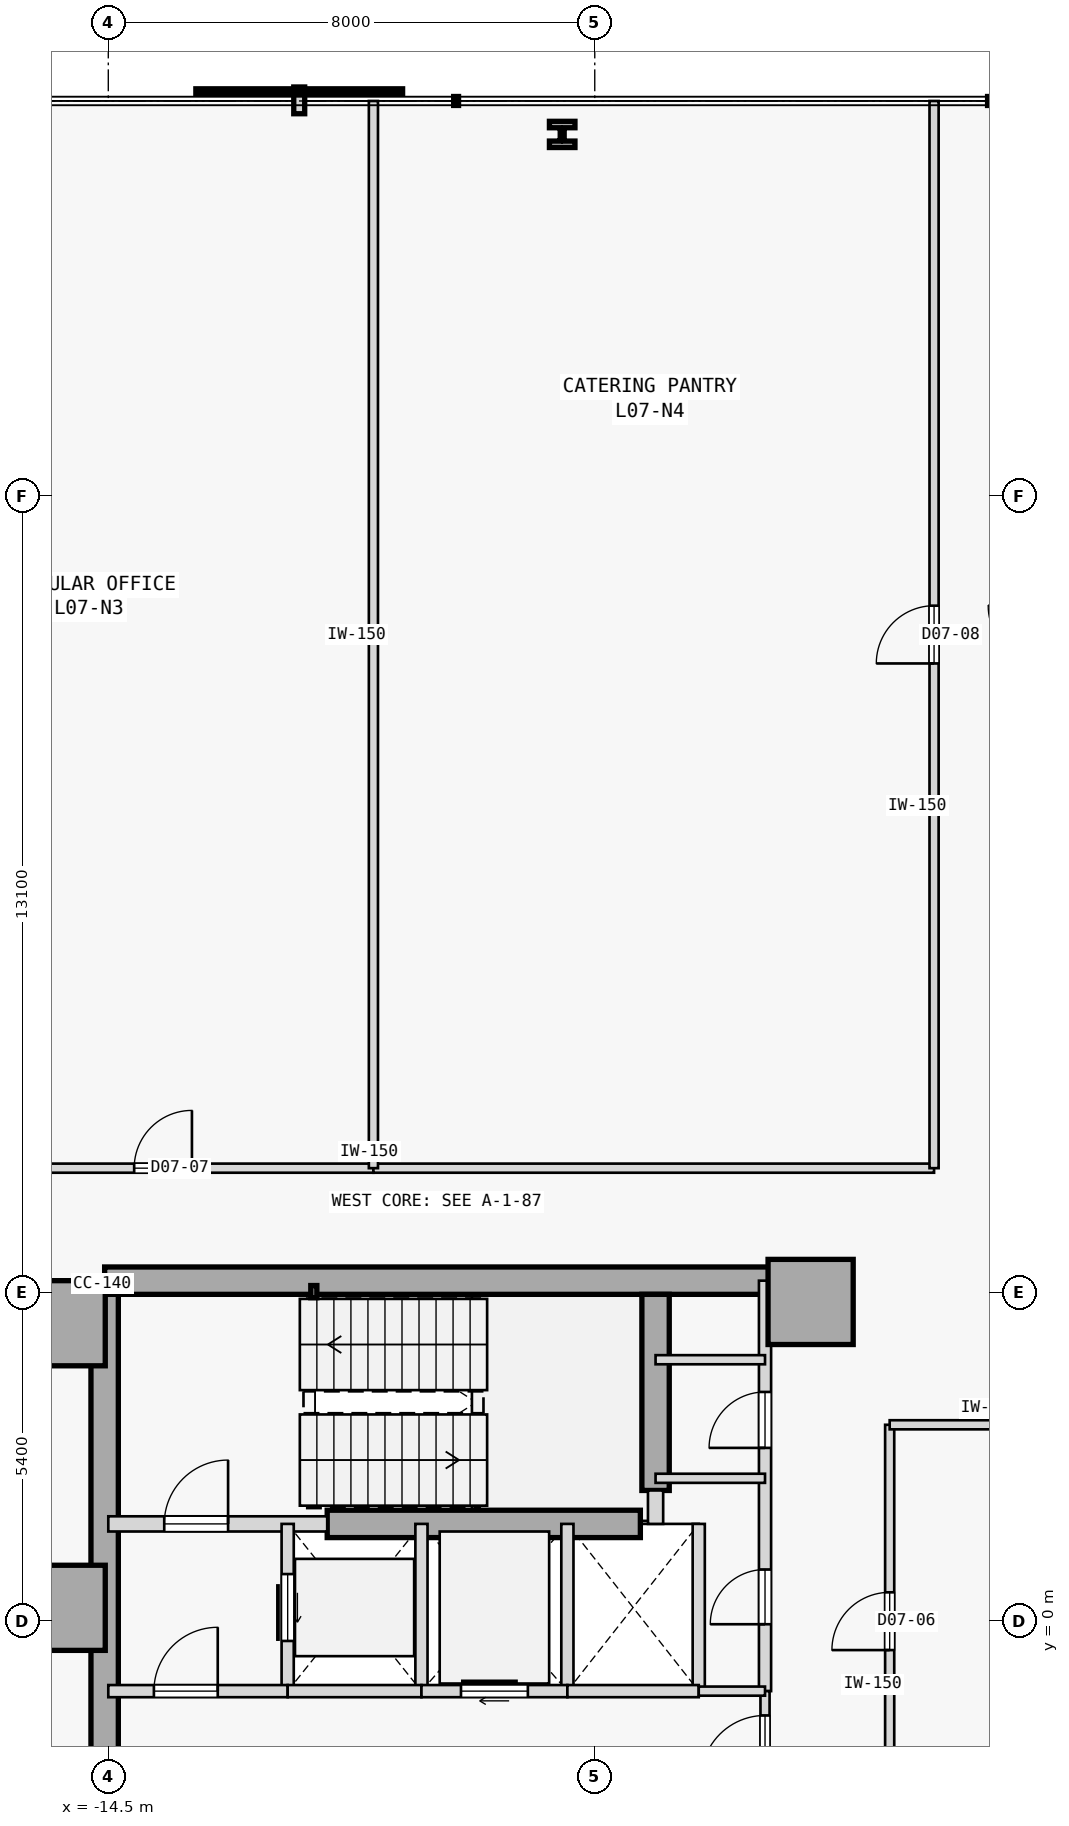
"""IFC4 building model, lengths in metres.
Left out: names, types, materials, properties, quantities, classifications, styles, units other than length and angle.
Written with IfcOpenShell. Run it as: python <this file> out.ifc"""

import sys

from ifc_helpers import new_model, si_unit, direction, frame, frame_2d, origin, origin_2d, place, context, subcontext, project, spatial, rectangle, hollow_rectangle, i_section, extrude, element, fill, save


model = new_model("IFC4")
c1 = context("Model", 3, precision=1e-05, world=origin(), true_north=direction((0.0, 1.0)))
c2 = subcontext(c1, "Body", "Model", "MODEL_VIEW")
j1 = project(units=[si_unit("LENGTHUNIT", "METRE"), si_unit("PLANEANGLEUNIT", "RADIAN")], contexts=[c1])
p1 = place(None, origin())
s1 = spatial("IfcSite", under=j1, at=p1, CompositionType="ELEMENT")
p2 = place(p1, origin())
s2 = spatial("IfcBuilding", under=s1, at=p2, CompositionType="ELEMENT")
p3 = place(p2, frame((0.0, 0.0, 33.2)))
s3 = spatial("IfcBuildingStorey", under=s2, at=p3, CompositionType="ELEMENT", Elevation=33.2)
for number, where, z_axis, x_axis in (
    (1, (-15.25, 4.9, 0.0), (0.0, 0.0, 1.0), (1.0, 0.0, 0.0)),
    (2, (-15.25, 0.22, 0.0), (0.0, 0.0, 1.0), (1.0, 0.0, 0.0)),
    (3, (-2.95, 5.25, 0.0), (0.0, 0.0, 1.0), (1.0, 0.0, 0.0)),
):
    element("IfcColumn", number, at=place(p3, frame(where, z_axis=z_axis, x_axis=x_axis)), inside=s3, PredefinedType="COLUMN", context=c2, shape_type="SweptSolid", body=[
        extrude(rectangle(XDim=1.4, YDim=1.4, at=origin_2d()), origin(), (0.0, 0.0, 1.0), 3.8),
    ])
p4 = place(p3, frame((-14.56, 5.6, 0.0), z_axis=(0.0, 0.0, 1.0), x_axis=(1.0, 0.0, 0.0)))
e4 = element("IfcWall", 4, at=p4, inside=s3, PredefinedType="SHEAR", context=c2, shape_type="SweptSolid", body=[
    extrude(rectangle(XDim=11.41, YDim=0.45, at=frame_2d((5.705, 0.0))), origin(), (0.0, 0.0, 1.0), 3.575),
])
p5 = place(p3, frame((-14.56, -5.375, 0.0), z_axis=(0.0, 0.0, 1.0), x_axis=(0.0, 1.0, 0.0)))
e5 = element("IfcWall", 5, at=p5, inside=s3, PredefinedType="SHEAR", context=c2, shape_type="SweptSolid", body=[
    extrude(rectangle(XDim=10.75, YDim=0.45, at=frame_2d((5.375, 0.0))), origin(), (0.0, 0.0, 1.0), 3.575),
])
p6 = place(p3, frame((-5.5, 2.15, 0.0), z_axis=(0.0, 0.0, 1.0), x_axis=(0.0, 1.0, 0.0)))
e6 = element("IfcWall", 6, at=p6, inside=s3, PredefinedType="SHEAR", context=c2, shape_type="SweptSolid", body=[
    extrude(rectangle(XDim=3.225, YDim=0.45, at=frame_2d((1.613, 0.0))), origin(), (0.0, 0.0, 1.0), 3.575),
])
p7 = place(p3, frame((-10.9, 1.6, 0.0), z_axis=(0.0, 0.0, 1.0), x_axis=(1.0, 0.0, 0.0)))
e7 = element("IfcWall", 7, at=p7, inside=s3, PredefinedType="SHEAR", context=c2, shape_type="SweptSolid", body=[
    extrude(rectangle(XDim=5.15, YDim=0.45, at=frame_2d((2.575, 0.0))), origin(), (0.0, 0.0, 1.0), 3.575),
])
p8 = place(p3, frame((-11.12, 5.42, 0.0), z_axis=(0.0, 0.0, 1.0), x_axis=(1.0, 0.0, 0.0)))
e8 = element("IfcColumn", 8, at=p8, inside=s3, PredefinedType="COLUMN", context=c2, shape_type="SweptSolid", body=[
    extrude(hollow_rectangle(XDim=0.1, YDim=0.2, WallThickness=0.008, at=origin_2d()), origin(), (0.0, 0.0, 1.0), 3.8),
])
p9 = place(p3, frame((-7.036, 24.45, 0.0), z_axis=(0.0, 0.0, 1.0), x_axis=(1.0, 0.0, 0.0)))
e9 = element("IfcColumn", 9, at=p9, inside=s3, PredefinedType="COLUMN", context=c2, shape_type="SweptSolid", body=[
    extrude(i_section(OverallWidth=0.42, OverallDepth=0.431, WebThickness=0.065, FlangeThickness=0.106, FilletRadius=0.015, at=origin_2d()), origin(), (0.0, 0.0, 1.0), 3.8),
])
p10 = place(p3, frame((-14.5, 1.6, 0.0), z_axis=(0.0, 0.0, 1.0), x_axis=(1.0, 0.0, 0.0)))
e10 = element("IfcWall", 10, at=p10, inside=s3, PredefinedType="STANDARD", context=c2, shape_type="SweptSolid", body=[
    extrude(rectangle(XDim=3.6, YDim=0.25, at=frame_2d((1.8, 0.0))), origin(), (0.0, 0.0, 1.0), 3.575),
])
p11 = place(p10, frame((0.92, 0.0, 0.0)))
e11 = element("IfcOpeningElement", 11, at=p11, cuts=e10, PredefinedType="OPENING", context=c2, shape_type="SweptSolid", body=[
    extrude(rectangle(XDim=1.05, YDim=2.15, at=frame_2d((0.525, 1.075))), frame((0.0, 0.135, 0.0), z_axis=(0.0, -1.0, 0.0), x_axis=(1.0, 0.0, 0.0)), (0.0, 0.0, 1.0), 0.27),
])
p12 = place(p3, frame((-5.5, 1.6, 0.0), z_axis=(0.0, 0.0, 1.0), x_axis=(0.0, 1.0, 0.0)))
e12 = element("IfcWall", 12, at=p12, inside=s3, PredefinedType="STANDARD", context=c2, shape_type="SweptSolid", body=[
    extrude(rectangle(XDim=0.55, YDim=0.25, at=frame_2d((0.275, 0.0))), origin(), (0.0, 0.0, 1.0), 3.575),
])
p13 = place(p3, frame((-3.7, -1.15, 0.0), z_axis=(0.0, 0.0, 1.0), x_axis=(0.0, 1.0, 0.0)))
e13 = element("IfcWall", 13, at=p13, inside=s3, PredefinedType="STANDARD", context=c2, shape_type="SweptSolid", body=[
    extrude(rectangle(XDim=6.75, YDim=0.2, at=frame_2d((3.375, 0.0))), origin(), (0.0, 0.0, 1.0), 3.575),
])
p14 = place(p13, frame((1.1, 0.0, 0.0)))
e14 = element("IfcOpeningElement", 14, at=p14, cuts=e13, PredefinedType="OPENING", context=c2, shape_type="SweptSolid", body=[
    extrude(rectangle(XDim=0.9, YDim=2.15, at=frame_2d((0.45, 1.075))), frame((0.0, 0.11, 0.0), z_axis=(0.0, -1.0, 0.0), x_axis=(1.0, 0.0, 0.0)), (0.0, 0.0, 1.0), 0.22),
])
p15 = place(p13, frame((4.0, 0.0, 0.0)))
e15 = element("IfcOpeningElement", 15, at=p15, cuts=e13, PredefinedType="OPENING", context=c2, shape_type="SweptSolid", body=[
    extrude(rectangle(XDim=0.92, YDim=2.15, at=frame_2d((0.46, 1.075))), frame((0.0, 0.11, 0.0), z_axis=(0.0, -1.0, 0.0), x_axis=(1.0, 0.0, 0.0)), (0.0, 0.0, 1.0), 0.22),
])
p16 = place(p3, frame((-3.7, -2.95, 0.0), z_axis=(0.0, 0.0, 1.0), x_axis=(0.0, 1.0, 0.0)))
e16 = element("IfcWall", 16, at=p16, inside=s3, PredefinedType="PARTITIONING", context=c2, shape_type="SweptSolid", body=[
    extrude(rectangle(XDim=1.8, YDim=0.15, at=frame_2d((0.9, 0.0))), origin(), (0.0, 0.0, 1.0), 3.575),
])
p17 = place(p16, frame((0.35, 0.0, 0.0)))
e17 = element("IfcOpeningElement", 17, at=p17, cuts=e16, PredefinedType="OPENING", context=c2, shape_type="SweptSolid", body=[
    extrude(rectangle(XDim=1.05, YDim=2.18, at=frame_2d((0.525, 1.09))), frame((0.0, 0.085, 0.0), z_axis=(0.0, -1.0, 0.0), x_axis=(1.0, 0.0, 0.0)), (0.0, 0.0, 1.0), 0.17),
])
p18 = place(p3, frame((-11.55, -1.15, 0.0), z_axis=(0.0, 0.0, 1.0), x_axis=(0.0, 1.0, 0.0)))
e18 = element("IfcWall", 18, at=p18, inside=s3, PredefinedType="STANDARD", context=c2, shape_type="SweptSolid", body=[
    extrude(rectangle(XDim=2.75, YDim=0.2, at=frame_2d((1.375, 0.0))), origin(), (0.0, 0.0, 1.0), 3.575),
])
p19 = place(p18, frame((0.825, 0.0, 0.0)))
e19 = element("IfcOpeningElement", 19, at=p19, cuts=e18, PredefinedType="OPENING", context=c2, shape_type="SweptSolid", body=[
    extrude(rectangle(XDim=1.1, YDim=2.15, at=frame_2d((0.55, 1.075))), frame((0.0, 0.11, 0.0), z_axis=(0.0, -1.0, 0.0), x_axis=(1.0, 0.0, 0.0)), (0.0, 0.0, 1.0), 0.22),
])
p20 = place(p3, frame((-9.35, -1.15, 0.0), z_axis=(0.0, 0.0, 1.0), x_axis=(0.0, 1.0, 0.0)))
e20 = element("IfcWall", 20, at=p20, inside=s3, PredefinedType="STANDARD", context=c2, shape_type="SweptSolid", body=[
    extrude(rectangle(XDim=2.75, YDim=0.2, at=frame_2d((1.375, 0.0))), origin(), (0.0, 0.0, 1.0), 3.575),
])
p21 = place(p3, frame((-14.5, -1.15, 0.0), z_axis=(0.0, 0.0, 1.0), x_axis=(1.0, 0.0, 0.0)))
e21 = element("IfcWall", 21, at=p21, inside=s3, PredefinedType="STANDARD", context=c2, shape_type="SweptSolid", body=[
    extrude(rectangle(XDim=2.95, YDim=0.2, at=frame_2d((1.475, 0.0))), origin(), (0.0, 0.0, 1.0), 3.575),
])
p22 = place(p21, frame((0.75, 0.0, 0.0)))
e22 = element("IfcOpeningElement", 22, at=p22, cuts=e21, PredefinedType="OPENING", context=c2, shape_type="SweptSolid", body=[
    extrude(rectangle(XDim=1.05, YDim=2.18, at=frame_2d((0.525, 1.09))), frame((0.0, 0.11, 0.0), z_axis=(0.0, -1.0, 0.0), x_axis=(1.0, 0.0, 0.0)), (0.0, 0.0, 1.0), 0.22),
])
p23 = place(p3, frame((-11.55, -1.15, 0.0), z_axis=(0.0, 0.0, 1.0), x_axis=(1.0, 0.0, 0.0)))
e23 = element("IfcWall", 23, at=p23, inside=s3, PredefinedType="STANDARD", context=c2, shape_type="SweptSolid", body=[
    extrude(rectangle(XDim=2.2, YDim=0.2, at=frame_2d((1.1, 0.0))), origin(), (0.0, 0.0, 1.0), 3.575),
])
p24 = place(p3, frame((-6.95, -1.15, 0.0), z_axis=(0.0, 0.0, 1.0), x_axis=(0.0, 1.0, 0.0)))
e24 = element("IfcWall", 24, at=p24, inside=s3, PredefinedType="STANDARD", context=c2, shape_type="SweptSolid", body=[
    extrude(rectangle(XDim=2.75, YDim=0.2, at=frame_2d((1.375, 0.0))), origin(), (0.0, 0.0, 1.0), 3.575),
])
p25 = place(p3, frame((-9.35, -1.15, 0.0), z_axis=(0.0, 0.0, 1.0), x_axis=(1.0, 0.0, 0.0)))
e25 = element("IfcWall", 25, at=p25, inside=s3, PredefinedType="STANDARD", context=c2, shape_type="SweptSolid", body=[
    extrude(rectangle(XDim=2.4, YDim=0.2, at=frame_2d((1.2, 0.0))), origin(), (0.0, 0.0, 1.0), 3.575),
])
p26 = place(p25, frame((0.65, 0.0, 0.0)))
e26 = element("IfcOpeningElement", 26, at=p26, cuts=e25, PredefinedType="OPENING", context=c2, shape_type="SweptSolid", body=[
    extrude(rectangle(XDim=1.1, YDim=2.15, at=frame_2d((0.55, 1.075))), frame((0.0, 0.11, 0.0), z_axis=(0.0, -1.0, 0.0), x_axis=(1.0, 0.0, 0.0)), (0.0, 0.0, 1.0), 0.22),
])
p27 = place(p3, frame((-4.79, -1.15, 0.0), z_axis=(0.0, 0.0, 1.0), x_axis=(0.0, 1.0, 0.0)))
e27 = element("IfcWall", 27, at=p27, inside=s3, PredefinedType="STANDARD", context=c2, shape_type="SweptSolid", body=[
    extrude(rectangle(XDim=2.75, YDim=0.2, at=frame_2d((1.375, 0.0))), origin(), (0.0, 0.0, 1.0), 3.575),
])
p28 = place(p3, frame((-6.95, -1.15, 0.0), z_axis=(0.0, 0.0, 1.0), x_axis=(1.0, 0.0, 0.0)))
e28 = element("IfcWall", 28, at=p28, inside=s3, PredefinedType="STANDARD", context=c2, shape_type="SweptSolid", body=[
    extrude(rectangle(XDim=2.16, YDim=0.2, at=frame_2d((1.08, 0.0))), origin(), (0.0, 0.0, 1.0), 3.575),
])
p29 = place(p3, frame((-4.79, -1.15, 0.0), z_axis=(0.0, 0.0, 1.0), x_axis=(1.0, 0.0, 0.0)))
e29 = element("IfcWall", 29, at=p29, inside=s3, PredefinedType="PARTITIONING", context=c2, shape_type="SweptSolid", body=[
    extrude(rectangle(XDim=1.09, YDim=0.15, at=frame_2d((0.545, 0.0))), origin(), (0.0, 0.0, 1.0), 3.575),
])
for number, where, z_axis, x_axis in (
    (30, (-5.5, 4.3, 0.0), (0.0, 0.0, 1.0), (1.0, 0.0, 0.0)),
    (31, (-5.5, 2.35, 0.0), (0.0, 0.0, 1.0), (1.0, 0.0, 0.0)),
):
    element("IfcWall", number, at=place(p3, frame(where, z_axis=z_axis, x_axis=x_axis)), inside=s3, PredefinedType="PARTITIONING", context=c2, shape_type="SweptSolid", body=[
        extrude(rectangle(XDim=1.8, YDim=0.15, at=frame_2d((0.9, 0.0))), origin(), (0.0, 0.0, 1.0), 3.575),
    ])
p30 = place(p3, frame((-1.65, -3.23, 0.0), z_axis=(0.0, 0.0, 1.0), x_axis=(0.0, 1.0, 0.0)))
e32 = element("IfcWall", 32, at=p30, inside=s3, PredefinedType="PARTITIONING", context=c2, shape_type="SweptSolid", body=[
    extrude(rectangle(XDim=6.46, YDim=0.15, at=frame_2d((3.23, 0.0))), origin(), (0.0, 0.0, 1.0), 3.575),
])
p31 = place(p30, frame((2.755, 0.0, 0.0)))
e33 = element("IfcOpeningElement", 33, at=p31, cuts=e32, PredefinedType="OPENING", context=c2, shape_type="SweptSolid", body=[
    extrude(rectangle(XDim=0.95, YDim=2.15, at=frame_2d((0.475, 1.075))), frame((0.0, 0.085, 0.0), z_axis=(0.0, -1.0, 0.0), x_axis=(1.0, 0.0, 0.0)), (0.0, 0.0, 1.0), 0.17),
])
p32 = place(p3, frame((-1.65, 3.23, 0.0), z_axis=(0.0, 0.0, 1.0), x_axis=(1.0, 0.0, 0.0)))
e34 = element("IfcWall", 34, at=p32, inside=s3, PredefinedType="PARTITIONING", context=c2, shape_type="SweptSolid", body=[
    extrude(rectangle(XDim=3.3, YDim=0.15, at=frame_2d((1.65, 0.0))), origin(), (0.0, 0.0, 1.0), 3.575),
])
p33 = place(p3, frame((-17.059, 7.45, 0.0), z_axis=(0.0, 0.0, 1.0), x_axis=(1.0, 0.0, 0.0)))
e35 = element("IfcWall", 35, at=p33, inside=s3, PredefinedType="PARTITIONING", context=c2, shape_type="SweptSolid", body=[
    extrude(rectangle(XDim=6.919, YDim=0.15, at=frame_2d((3.459, 0.0))), origin(), (0.0, 0.0, 1.0), 3.575),
])
p34 = place(p33, frame((2.985, 0.0, 0.0)))
e36 = element("IfcOpeningElement", 36, at=p34, cuts=e35, PredefinedType="OPENING", context=c2, shape_type="SweptSolid", body=[
    extrude(rectangle(XDim=0.95, YDim=2.15, at=frame_2d((0.475, 1.075))), frame((0.0, 0.085, 0.0), z_axis=(0.0, -1.0, 0.0), x_axis=(1.0, 0.0, 0.0)), (0.0, 0.0, 1.0), 0.17),
])
p35 = place(p3, frame((-10.14, 7.45, 0.0), z_axis=(0.0, 0.0, 1.0), x_axis=(1.0, 0.0, 0.0)))
e37 = element("IfcWall", 37, at=p35, inside=s3, PredefinedType="PARTITIONING", context=c2, shape_type="SweptSolid", body=[
    extrude(rectangle(XDim=9.22, YDim=0.15, at=frame_2d((4.61, 0.0))), origin(), (0.0, 0.0, 1.0), 3.575),
])
p36 = place(p3, frame((-0.92, 7.45, 0.0), z_axis=(0.0, 0.0, 1.0), x_axis=(0.0, 1.0, 0.0)))
e38 = element("IfcWall", 38, at=p36, inside=s3, PredefinedType="PARTITIONING", context=c2, shape_type="SweptSolid", body=[
    extrude(rectangle(XDim=17.55, YDim=0.15, at=frame_2d((8.775, 0.0))), origin(), (0.0, 0.0, 1.0), 3.575),
])
p37 = place(p36, frame((8.3, 0.0, 0.0)))
e39 = element("IfcOpeningElement", 39, at=p37, cuts=e38, PredefinedType="OPENING", context=c2, shape_type="SweptSolid", body=[
    extrude(rectangle(XDim=0.95, YDim=2.15, at=frame_2d((0.475, 1.075))), frame((0.0, 0.085, 0.0), z_axis=(0.0, -1.0, 0.0), x_axis=(1.0, 0.0, 0.0)), (0.0, 0.0, 1.0), 0.17),
])
p38 = place(p3, frame((-10.14, 7.45, 0.0), z_axis=(0.0, 0.0, 1.0), x_axis=(0.0, 1.0, 0.0)))
e40 = element("IfcWall", 40, at=p38, inside=s3, PredefinedType="PARTITIONING", context=c2, shape_type="SweptSolid", body=[
    extrude(rectangle(XDim=17.55, YDim=0.15, at=frame_2d((8.775, 0.0))), origin(), (0.0, 0.0, 1.0), 3.575),
])
p39 = place(p11, origin())
e41 = element("IfcDoor", 41, at=p39, inside=s3, OperationType="SINGLE_SWING_RIGHT", PredefinedType="DOOR", context=c2, shape_type="SweptSolid", body=[
    extrude(rectangle(XDim=1.05, YDim=2.15, at=frame_2d((0.525, 1.075))), frame((0.0, 0.025, 0.0), z_axis=(0.0, -1.0, 0.0), x_axis=(1.0, 0.0, 0.0)), (0.0, 0.0, 1.0), 0.05),
])
fill(e11, e41)
p40 = place(p22, origin())
e42 = element("IfcDoor", 42, at=p40, inside=s3, OperationType="SINGLE_SWING_RIGHT", PredefinedType="DOOR", context=c2, shape_type="SweptSolid", body=[
    extrude(rectangle(XDim=1.05, YDim=2.18, at=frame_2d((0.525, 1.09))), frame((0.0, 0.025, 0.0), z_axis=(0.0, -1.0, 0.0), x_axis=(1.0, 0.0, 0.0)), (0.0, 0.0, 1.0), 0.05),
])
fill(e22, e42)
p41 = place(p17, origin())
e43 = element("IfcDoor", 43, at=p41, inside=s3, OperationType="SINGLE_SWING_LEFT", PredefinedType="DOOR", context=c2, shape_type="SweptSolid", body=[
    extrude(rectangle(XDim=1.05, YDim=2.18, at=frame_2d((0.525, 1.09))), frame((0.0, 0.025, 0.0), z_axis=(0.0, -1.0, 0.0), x_axis=(1.0, 0.0, 0.0)), (0.0, 0.0, 1.0), 0.05),
])
fill(e17, e43)
p42 = place(p19, origin())
e44 = element("IfcDoor", 44, at=p42, inside=s3, OperationType="SLIDING_TO_RIGHT", PredefinedType="DOOR", context=c2, shape_type="SweptSolid", body=[
    extrude(rectangle(XDim=1.1, YDim=2.15, at=frame_2d((0.55, 1.075))), frame((0.0, 0.025, 0.0), z_axis=(0.0, -1.0, 0.0), x_axis=(1.0, 0.0, 0.0)), (0.0, 0.0, 1.0), 0.05),
])
fill(e19, e44)
p43 = place(p26, origin())
e45 = element("IfcDoor", 45, at=p43, inside=s3, OperationType="SLIDING_TO_RIGHT", PredefinedType="DOOR", context=c2, shape_type="SweptSolid", body=[
    extrude(rectangle(XDim=1.1, YDim=2.15, at=frame_2d((0.55, 1.075))), frame((0.0, 0.025, 0.0), z_axis=(0.0, -1.0, 0.0), x_axis=(1.0, 0.0, 0.0)), (0.0, 0.0, 1.0), 0.05),
])
fill(e26, e45)
p44 = place(p14, origin())
e46 = element("IfcDoor", 46, at=p44, inside=s3, OperationType="SINGLE_SWING_LEFT", PredefinedType="DOOR", context=c2, shape_type="SweptSolid", body=[
    extrude(rectangle(XDim=0.9, YDim=2.15, at=frame_2d((0.45, 1.075))), frame((0.0, 0.025, 0.0), z_axis=(0.0, -1.0, 0.0), x_axis=(1.0, 0.0, 0.0)), (0.0, 0.0, 1.0), 0.05),
])
fill(e14, e46)
p45 = place(p15, origin())
e47 = element("IfcDoor", 47, at=p45, inside=s3, OperationType="SINGLE_SWING_LEFT", PredefinedType="DOOR", context=c2, shape_type="SweptSolid", body=[
    extrude(rectangle(XDim=0.92, YDim=2.15, at=frame_2d((0.46, 1.075))), frame((0.0, 0.025, 0.0), z_axis=(0.0, -1.0, 0.0), x_axis=(1.0, 0.0, 0.0)), (0.0, 0.0, 1.0), 0.05),
])
fill(e15, e47)
p46 = place(p31, origin())
e48 = element("IfcDoor", 48, at=p46, inside=s3, OperationType="SINGLE_SWING_LEFT", PredefinedType="DOOR", context=c2, shape_type="SweptSolid", body=[
    extrude(rectangle(XDim=0.95, YDim=2.15, at=frame_2d((0.475, 1.075))), frame((0.0, 0.025, 0.0), z_axis=(0.0, -1.0, 0.0), x_axis=(1.0, 0.0, 0.0)), (0.0, 0.0, 1.0), 0.05),
])
fill(e33, e48)
p47 = place(p34, origin())
e49 = element("IfcDoor", 49, at=p47, inside=s3, OperationType="SINGLE_SWING_RIGHT", PredefinedType="DOOR", context=c2, shape_type="SweptSolid", body=[
    extrude(rectangle(XDim=0.95, YDim=2.15, at=frame_2d((0.475, 1.075))), frame((0.0, 0.025, 0.0), z_axis=(0.0, -1.0, 0.0), x_axis=(1.0, 0.0, 0.0)), (0.0, 0.0, 1.0), 0.05),
])
fill(e36, e49)
p48 = place(p37, origin())
e50 = element("IfcDoor", 50, at=p48, inside=s3, OperationType="SINGLE_SWING_LEFT", PredefinedType="DOOR", context=c2, shape_type="SweptSolid", body=[
    extrude(rectangle(XDim=0.95, YDim=2.15, at=frame_2d((0.475, 1.075))), frame((0.0, 0.025, 0.0), z_axis=(0.0, -1.0, 0.0), x_axis=(1.0, 0.0, 0.0)), (0.0, 0.0, 1.0), 0.05),
])
fill(e39, e50)
save(model, sys.argv[1])
